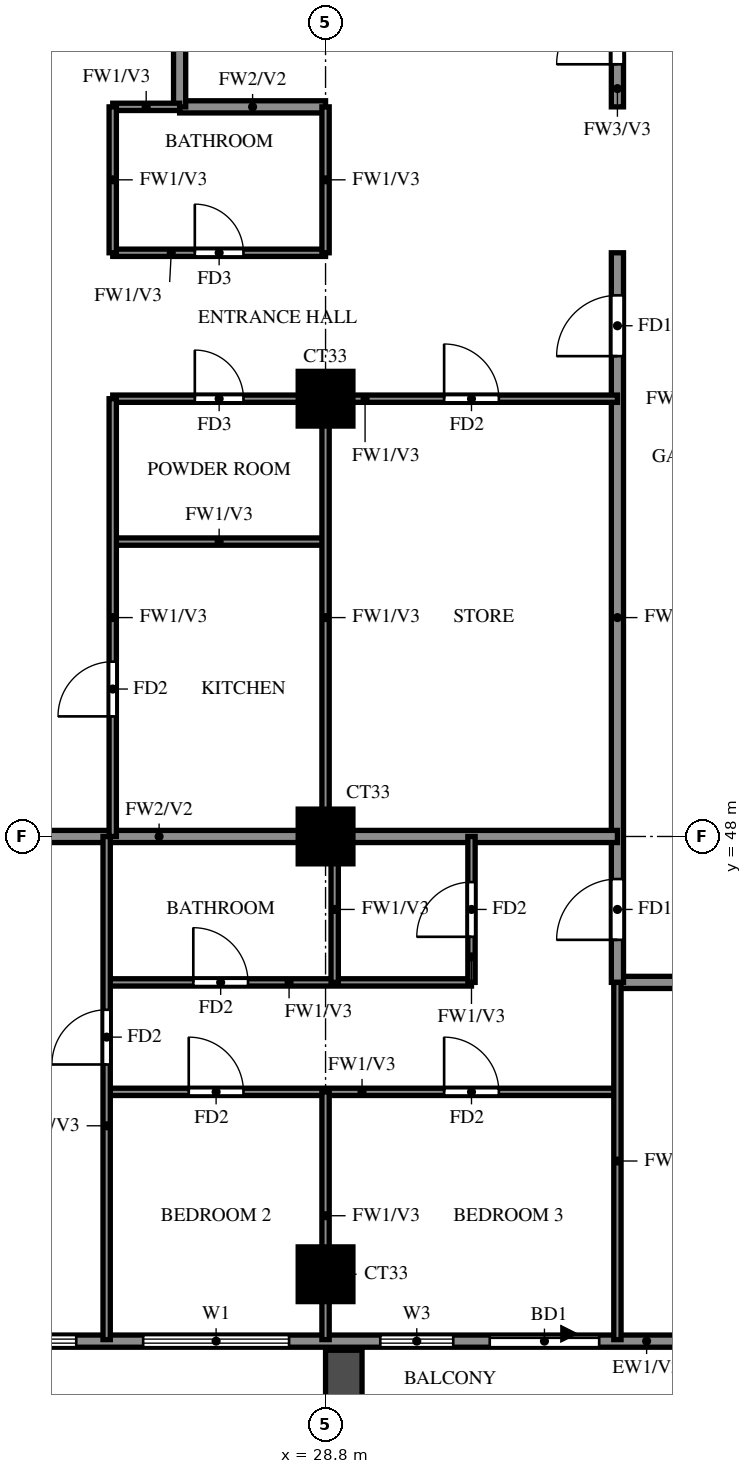
"""IFC4 building model, lengths in metres.
Left out: names, types, materials, properties, quantities, classifications, styles, units other than length and angle.
Written with IfcOpenShell. Run it as: python <this file> out.ifc"""

import sys

from ifc_helpers import new_model, si_unit, direction, frame, frame_2d, origin, origin_2d, place, context, subcontext, project, spatial, rectangle, extrude, source, transform, mapped, element, fill, save


model = new_model("IFC4")
c1 = context("Model", 3, precision=1e-05, world=origin(), true_north=direction((0.0, 1.0)))
c2 = subcontext(c1, "Body", "Model", "MODEL_VIEW")
j1 = project(units=[si_unit("LENGTHUNIT", "METRE"), si_unit("PLANEANGLEUNIT", "RADIAN")], contexts=[c1])
p1 = place(None, origin())
s1 = spatial("IfcSite", under=j1, at=p1, CompositionType="ELEMENT")
p2 = place(p1, origin())
s2 = spatial("IfcBuilding", under=s1, at=p2, CompositionType="ELEMENT")
p3 = place(p2, frame((0.0, 0.0, 222.0)))
s3 = spatial("IfcBuildingStorey", under=s2, at=p3, CompositionType="ELEMENT", Elevation=222.0)
m1 = source(origin(), c2, "Body", "SweptSolid", [
    extrude(rectangle(XDim=0.9, YDim=0.9, at=origin_2d()), origin(), (0.0, 0.0, 1.0), 3.22),
])
for number, where, z_axis, x_axis in (
    (1, (28.8, 40.8, 0.0), (0.0, 0.0, 1.0), (1.0, 0.0, 0.0)),
    (2, (28.8, 48.0, 0.0), (0.0, 0.0, 1.0), (1.0, 0.0, 0.0)),
    (3, (28.8, 55.2, 0.0), (0.0, 0.0, 1.0), (1.0, 0.0, 0.0)),
):
    element("IfcColumn", number, at=place(p3, frame(where, z_axis=z_axis, x_axis=x_axis)), inside=s3, PredefinedType="COLUMN", context=c2, shape_type="MappedRepresentation", body=[
        mapped(m1, transform((0.0, 0.0, 0.0))),
    ])
p4 = place(p3, frame((22.2, 39.7, 0.0), z_axis=(0.0, 0.0, 1.0), x_axis=(1.0, 0.0, 0.0)))
e4 = element("IfcWall", 4, at=p4, inside=s3, PredefinedType="SOLIDWALL", context=c2, shape_type="SweptSolid", body=[
    extrude(rectangle(XDim=19.8, YDim=0.2, at=frame_2d((9.9, 0.0))), origin(), (0.0, 0.0, 1.0), 3.22),
])
p5 = place(p4, frame((9.3, 0.0, 0.0)))
e5 = element("IfcOpeningElement", 5, at=p5, cuts=e4, PredefinedType="OPENING", context=c2, shape_type="SweptSolid", body=[
    extrude(rectangle(XDim=1.8, YDim=2.4, at=frame_2d((0.9, 1.2))), frame((0.0, 0.11, 0.0), z_axis=(0.0, -1.0, 0.0), x_axis=(1.0, 0.0, 0.0)), (0.0, 0.0, 1.0), 0.22),
])
p6 = place(p4, frame((0.7, 0.0, 0.6)))
e6 = element("IfcOpeningElement", 6, at=p6, cuts=e4, PredefinedType="OPENING", context=c2, shape_type="SweptSolid", body=[
    extrude(rectangle(XDim=1.8, YDim=2.4, at=frame_2d((0.9, 1.2))), frame((0.0, 0.11, 0.0), z_axis=(0.0, -1.0, 0.0), x_axis=(1.0, 0.0, 0.0)), (0.0, 0.0, 1.0), 0.22),
])
p7 = place(p4, frame((3.6, 0.0, 0.6)))
e7 = element("IfcOpeningElement", 7, at=p7, cuts=e4, PredefinedType="OPENING", context=c2, shape_type="SweptSolid", body=[
    extrude(rectangle(XDim=2.4, YDim=2.4, at=frame_2d((1.2, 1.2))), frame((0.0, 0.11, 0.0), z_axis=(0.0, -1.0, 0.0), x_axis=(1.0, 0.0, 0.0)), (0.0, 0.0, 1.0), 0.22),
])
p8 = place(p4, frame((7.5, 0.0, 0.6)))
e8 = element("IfcOpeningElement", 8, at=p8, cuts=e4, PredefinedType="OPENING", context=c2, shape_type="SweptSolid", body=[
    extrude(rectangle(XDim=1.2, YDim=2.4, at=frame_2d((0.6, 1.2))), frame((0.0, 0.11, 0.0), z_axis=(0.0, -1.0, 0.0), x_axis=(1.0, 0.0, 0.0)), (0.0, 0.0, 1.0), 0.22),
])
p9 = place(p3, frame((29.1, 39.55, 0.0), z_axis=(0.0, 0.0, 1.0), x_axis=(0.0, -1.0, 0.0)))
e9 = element("IfcWall", 9, at=p9, inside=s3, PredefinedType="SOLIDWALL", context=c2, shape_type="SweptSolid", body=[
    extrude(rectangle(XDim=2.65, YDim=0.6, at=frame_2d((1.325, 0.0))), origin(), (0.0, 0.0, 1.0), 2.85),
])
p10 = place(p3, frame((33.6, 45.6, 0.0), z_axis=(0.0, 0.0, 1.0), x_axis=(1.0, 0.0, 0.0)))
e10 = element("IfcWall", 10, at=p10, inside=s3, PredefinedType="SOLIDWALL", context=c2, shape_type="SweptSolid", body=[
    extrude(rectangle(XDim=7.2, YDim=0.2, at=frame_2d((3.6, 0.0))), origin(), (0.0, 0.0, 1.0), 3.22),
])
p11 = place(p10, frame((3.15, 0.0, 0.0)))
e11 = element("IfcOpeningElement", 11, at=p11, cuts=e10, PredefinedType="OPENING", context=c2, shape_type="SweptSolid", body=[
    extrude(rectangle(XDim=0.9, YDim=2.1, at=frame_2d((0.45, 1.05))), frame((0.0, 0.11, 0.0), z_axis=(0.0, -1.0, 0.0), x_axis=(1.0, 0.0, 0.0)), (0.0, 0.0, 1.0), 0.22),
])
p12 = place(p3, frame((33.6, 45.6, 0.0), z_axis=(0.0, 0.0, 1.0), x_axis=(0.0, 1.0, 0.0)))
e12 = element("IfcWall", 12, at=p12, inside=s3, PredefinedType="SOLIDWALL", context=c2, shape_type="SweptSolid", body=[
    extrude(rectangle(XDim=12.0, YDim=0.2, at=frame_2d((6.0, 0.0))), origin(), (0.0, 0.0, 1.0), 3.22),
])
p13 = place(p12, frame((0.7, 0.0, 0.0)))
e13 = element("IfcOpeningElement", 13, at=p13, cuts=e12, PredefinedType="OPENING", context=c2, shape_type="SweptSolid", body=[
    extrude(rectangle(XDim=1.0, YDim=2.1, at=frame_2d((0.5, 1.05))), frame((0.0, 0.11, 0.0), z_axis=(0.0, -1.0, 0.0), x_axis=(1.0, 0.0, 0.0)), (0.0, 0.0, 1.0), 0.22),
])
p14 = place(p12, frame((10.3, 0.0, 0.0)))
e14 = element("IfcOpeningElement", 14, at=p14, cuts=e12, PredefinedType="OPENING", context=c2, shape_type="SweptSolid", body=[
    extrude(rectangle(XDim=1.0, YDim=2.1, at=frame_2d((0.5, 1.05))), frame((0.0, 0.11, 0.0), z_axis=(0.0, -1.0, 0.0), x_axis=(1.0, 0.0, 0.0)), (0.0, 0.0, 1.0), 0.22),
])
p15 = place(p3, frame((33.6, 60.0, 0.0), z_axis=(0.0, 0.0, 1.0), x_axis=(0.0, 1.0, 0.0)))
e15 = element("IfcWall", 15, at=p15, inside=s3, PredefinedType="SOLIDWALL", context=c2, shape_type="SweptSolid", body=[
    extrude(rectangle(XDim=2.4, YDim=0.2, at=frame_2d((1.2, 0.0))), origin(), (0.0, 0.0, 1.0), 3.22),
])
p16 = place(p15, frame((0.7, 0.0, 0.0)))
e16 = element("IfcOpeningElement", 16, at=p16, cuts=e15, PredefinedType="OPENING", context=c2, shape_type="SweptSolid", body=[
    extrude(rectangle(XDim=1.0, YDim=2.1, at=frame_2d((0.5, 1.05))), frame((0.0, 0.11, 0.0), z_axis=(0.0, -1.0, 0.0), x_axis=(1.0, 0.0, 0.0)), (0.0, 0.0, 1.0), 0.22),
])
p17 = place(p3, frame((18.525, 48.0, 0.0), z_axis=(0.0, 0.0, 1.0), x_axis=(1.0, 0.0, 0.0)))
e17 = element("IfcWall", 17, at=p17, inside=s3, PredefinedType="SOLIDWALL", context=c2, shape_type="SweptSolid", body=[
    extrude(rectangle(XDim=15.075, YDim=0.2, at=frame_2d((7.538, 0.0))), origin(), (0.0, 0.0, 1.0), 3.22),
])
p18 = place(p3, frame((26.4, 60.0, 0.0), z_axis=(0.0, 0.0, 1.0), x_axis=(1.0, 0.0, 0.0)))
e18 = element("IfcWall", 18, at=p18, inside=s3, PredefinedType="SOLIDWALL", context=c2, shape_type="SweptSolid", body=[
    extrude(rectangle(XDim=2.4, YDim=0.2, at=frame_2d((1.2, 0.0))), origin(), (0.0, 0.0, 1.0), 3.22),
])
p19 = place(p3, frame((26.4, 60.0, 0.0), z_axis=(0.0, 0.0, 1.0), x_axis=(0.0, 1.0, 0.0)))
e19 = element("IfcWall", 19, at=p19, inside=s3, PredefinedType="SOLIDWALL", context=c2, shape_type="SweptSolid", body=[
    extrude(rectangle(XDim=2.4, YDim=0.2, at=frame_2d((1.2, 0.0))), origin(), (0.0, 0.0, 1.0), 3.22),
])
p20 = place(p3, frame((25.2, 43.8, 0.0), z_axis=(0.0, 0.0, 1.0), x_axis=(1.0, 0.0, 0.0)))
e20 = element("IfcWall", 20, at=p20, inside=s3, PredefinedType="PARTITIONING", context=c2, shape_type="SweptSolid", body=[
    extrude(rectangle(XDim=8.4, YDim=0.12, at=frame_2d((4.2, 0.0))), origin(), (0.0, 0.0, 1.0), 3.22),
])
p21 = place(p20, frame((1.35, 0.0, 0.0)))
e21 = element("IfcOpeningElement", 21, at=p21, cuts=e20, PredefinedType="OPENING", context=c2, shape_type="SweptSolid", body=[
    extrude(rectangle(XDim=0.9, YDim=2.1, at=frame_2d((0.45, 1.05))), frame((0.0, 0.07, 0.0), z_axis=(0.0, -1.0, 0.0), x_axis=(1.0, 0.0, 0.0)), (0.0, 0.0, 1.0), 0.14),
])
p22 = place(p20, frame((5.55, 0.0, 0.0)))
e22 = element("IfcOpeningElement", 22, at=p22, cuts=e20, PredefinedType="OPENING", context=c2, shape_type="SweptSolid", body=[
    extrude(rectangle(XDim=0.9, YDim=2.1, at=frame_2d((0.45, 1.05))), frame((0.0, 0.07, 0.0), z_axis=(0.0, -1.0, 0.0), x_axis=(1.0, 0.0, 0.0)), (0.0, 0.0, 1.0), 0.14),
])
p23 = place(p3, frame((25.2, 45.6, 0.0), z_axis=(0.0, 0.0, 1.0), x_axis=(1.0, 0.0, 0.0)))
e23 = element("IfcWall", 23, at=p23, inside=s3, PredefinedType="PARTITIONING", context=c2, shape_type="SweptSolid", body=[
    extrude(rectangle(XDim=6.0, YDim=0.12, at=frame_2d((3.0, 0.0))), origin(), (0.0, 0.0, 1.0), 3.22),
])
p24 = place(p23, frame((1.425, 0.0, 0.0)))
e24 = element("IfcOpeningElement", 24, at=p24, cuts=e23, PredefinedType="OPENING", context=c2, shape_type="SweptSolid", body=[
    extrude(rectangle(XDim=0.9, YDim=2.1, at=frame_2d((0.45, 1.05))), frame((0.0, 0.07, 0.0), z_axis=(0.0, -1.0, 0.0), x_axis=(1.0, 0.0, 0.0)), (0.0, 0.0, 1.0), 0.14),
])
p25 = place(p3, frame((25.3, 52.85, 0.0), z_axis=(0.0, 0.0, 1.0), x_axis=(1.0, 0.0, 0.0)))
e25 = element("IfcWall", 25, at=p25, inside=s3, PredefinedType="PARTITIONING", context=c2, shape_type="SweptSolid", body=[
    extrude(rectangle(XDim=3.5, YDim=0.12, at=frame_2d((1.75, 0.0))), origin(), (0.0, 0.0, 1.0), 3.22),
])
p26 = place(p3, frame((25.3, 55.2, 0.0), z_axis=(0.0, 0.0, 1.0), x_axis=(1.0, 0.0, 0.0)))
e26 = element("IfcWall", 26, at=p26, inside=s3, PredefinedType="PARTITIONING", context=c2, shape_type="SweptSolid", body=[
    extrude(rectangle(XDim=8.3, YDim=0.12, at=frame_2d((4.15, 0.0))), origin(), (0.0, 0.0, 1.0), 3.22),
])
p27 = place(p26, frame((1.35, 0.0, 0.0)))
e27 = element("IfcOpeningElement", 27, at=p27, cuts=e26, PredefinedType="OPENING", context=c2, shape_type="SweptSolid", body=[
    extrude(rectangle(XDim=0.8, YDim=2.1, at=frame_2d((0.4, 1.05))), frame((0.0, 0.07, 0.0), z_axis=(0.0, -1.0, 0.0), x_axis=(1.0, 0.0, 0.0)), (0.0, 0.0, 1.0), 0.14),
])
p28 = place(p26, frame((5.45, 0.0, 0.0)))
e28 = element("IfcOpeningElement", 28, at=p28, cuts=e26, PredefinedType="OPENING", context=c2, shape_type="SweptSolid", body=[
    extrude(rectangle(XDim=0.9, YDim=2.1, at=frame_2d((0.45, 1.05))), frame((0.0, 0.07, 0.0), z_axis=(0.0, -1.0, 0.0), x_axis=(1.0, 0.0, 0.0)), (0.0, 0.0, 1.0), 0.14),
])
p29 = place(p3, frame((25.3, 57.6, 0.0), z_axis=(0.0, 0.0, 1.0), x_axis=(1.0, 0.0, 0.0)))
e29 = element("IfcWall", 29, at=p29, inside=s3, PredefinedType="PARTITIONING", context=c2, shape_type="SweptSolid", body=[
    extrude(rectangle(XDim=3.5, YDim=0.12, at=frame_2d((1.75, 0.0))), origin(), (0.0, 0.0, 1.0), 3.22),
])
p30 = place(p29, frame((1.35, 0.0, 0.0)))
e30 = element("IfcOpeningElement", 30, at=p30, cuts=e29, PredefinedType="OPENING", context=c2, shape_type="SweptSolid", body=[
    extrude(rectangle(XDim=0.8, YDim=2.1, at=frame_2d((0.4, 1.05))), frame((0.0, 0.07, 0.0), z_axis=(0.0, -1.0, 0.0), x_axis=(1.0, 0.0, 0.0)), (0.0, 0.0, 1.0), 0.14),
])
p31 = place(p3, frame((25.3, 60.0, 0.0), z_axis=(0.0, 0.0, 1.0), x_axis=(1.0, 0.0, 0.0)))
e31 = element("IfcWall", 31, at=p31, inside=s3, PredefinedType="PARTITIONING", context=c2, shape_type="SweptSolid", body=[
    extrude(rectangle(XDim=1.1, YDim=0.12, at=frame_2d((0.55, 0.0))), origin(), (0.0, 0.0, 1.0), 3.22),
])
p32 = place(p3, frame((25.2, 39.725, 0.0), z_axis=(0.0, 0.0, 1.0), x_axis=(0.0, 1.0, 0.0)))
e32 = element("IfcWall", 32, at=p32, inside=s3, PredefinedType="PARTITIONING", context=c2, shape_type="SweptSolid", body=[
    extrude(rectangle(XDim=8.275, YDim=0.12, at=frame_2d((4.137, 0.0))), origin(), (0.0, 0.0, 1.0), 3.22),
])
p33 = place(p32, frame((4.525, 0.0, 0.0)))
e33 = element("IfcOpeningElement", 33, at=p33, cuts=e32, PredefinedType="OPENING", context=c2, shape_type="SweptSolid", body=[
    extrude(rectangle(XDim=0.9, YDim=2.1, at=frame_2d((0.45, 1.05))), frame((0.0, 0.07, 0.0), z_axis=(0.0, -1.0, 0.0), x_axis=(1.0, 0.0, 0.0)), (0.0, 0.0, 1.0), 0.14),
])
p34 = place(p3, frame((25.3, 48.0, 0.0), z_axis=(0.0, 0.0, 1.0), x_axis=(0.0, 1.0, 0.0)))
e34 = element("IfcWall", 34, at=p34, inside=s3, PredefinedType="PARTITIONING", context=c2, shape_type="SweptSolid", body=[
    extrude(rectangle(XDim=7.2, YDim=0.12, at=frame_2d((3.6, 0.0))), origin(), (0.0, 0.0, 1.0), 3.22),
])
p35 = place(p34, frame((1.975, 0.0, 0.0)))
e35 = element("IfcOpeningElement", 35, at=p35, cuts=e34, PredefinedType="OPENING", context=c2, shape_type="SweptSolid", body=[
    extrude(rectangle(XDim=0.9, YDim=2.1, at=frame_2d((0.45, 1.05))), frame((0.0, 0.07, 0.0), z_axis=(0.0, -1.0, 0.0), x_axis=(1.0, 0.0, 0.0)), (0.0, 0.0, 1.0), 0.14),
])
p36 = place(p3, frame((25.3, 57.6, 0.0), z_axis=(0.0, 0.0, 1.0), x_axis=(0.0, 1.0, 0.0)))
e36 = element("IfcWall", 36, at=p36, inside=s3, PredefinedType="PARTITIONING", context=c2, shape_type="SweptSolid", body=[
    extrude(rectangle(XDim=2.4, YDim=0.12, at=frame_2d((1.2, 0.0))), origin(), (0.0, 0.0, 1.0), 3.22),
])
p37 = place(p3, frame((28.8, 39.725, 0.0), z_axis=(0.0, 0.0, 1.0), x_axis=(0.0, 1.0, 0.0)))
e37 = element("IfcWall", 37, at=p37, inside=s3, PredefinedType="PARTITIONING", context=c2, shape_type="SweptSolid", body=[
    extrude(rectangle(XDim=4.075, YDim=0.12, at=frame_2d((2.038, 0.0))), origin(), (0.0, 0.0, 1.0), 3.22),
])
p38 = place(p3, frame((28.8, 48.0, 0.0), z_axis=(0.0, 0.0, 1.0), x_axis=(0.0, 1.0, 0.0)))
e38 = element("IfcWall", 38, at=p38, inside=s3, PredefinedType="PARTITIONING", context=c2, shape_type="SweptSolid", body=[
    extrude(rectangle(XDim=7.2, YDim=0.12, at=frame_2d((3.6, 0.0))), origin(), (0.0, 0.0, 1.0), 3.22),
])
for number, where, z_axis, x_axis in (
    (39, (28.8, 57.6, 0.0), (0.0, 0.0, 1.0), (0.0, 1.0, 0.0)),
    (40, (28.95, 45.6, 0.0), (0.0, 0.0, 1.0), (0.0, 1.0, 0.0)),
):
    element("IfcWall", number, at=place(p3, frame(where, z_axis=z_axis, x_axis=x_axis)), inside=s3, PredefinedType="PARTITIONING", context=c2, shape_type="SweptSolid", body=[
        extrude(rectangle(XDim=2.4, YDim=0.12, at=frame_2d((1.2, 0.0))), origin(), (0.0, 0.0, 1.0), 3.22),
    ])
p39 = place(p3, frame((31.2, 45.6, 0.0), z_axis=(0.0, 0.0, 1.0), x_axis=(0.0, 1.0, 0.0)))
e41 = element("IfcWall", 41, at=p39, inside=s3, PredefinedType="PARTITIONING", context=c2, shape_type="SweptSolid", body=[
    extrude(rectangle(XDim=2.4, YDim=0.12, at=frame_2d((1.2, 0.0))), origin(), (0.0, 0.0, 1.0), 3.22),
])
p40 = place(p39, frame((0.75, 0.0, 0.0)))
e42 = element("IfcOpeningElement", 42, at=p40, cuts=e41, PredefinedType="OPENING", context=c2, shape_type="SweptSolid", body=[
    extrude(rectangle(XDim=0.9, YDim=2.1, at=frame_2d((0.45, 1.05))), frame((0.0, 0.07, 0.0), z_axis=(0.0, -1.0, 0.0), x_axis=(1.0, 0.0, 0.0)), (0.0, 0.0, 1.0), 0.14),
])
p41 = place(p3, frame((33.6, 39.725, 0.0), z_axis=(0.0, 0.0, 1.0), x_axis=(0.0, 1.0, 0.0)))
e43 = element("IfcWall", 43, at=p41, inside=s3, PredefinedType="PARTITIONING", context=c2, shape_type="SweptSolid", body=[
    extrude(rectangle(XDim=5.875, YDim=0.12, at=frame_2d((2.938, 0.0))), origin(), (0.0, 0.0, 1.0), 3.22),
])
p42 = place(p5, origin())
e44 = element("IfcDoor", 44, at=p42, inside=s3, OperationType="DOUBLE_DOOR_SLIDING", PredefinedType="DOOR", context=c2, shape_type="SweptSolid", body=[
    extrude(rectangle(XDim=1.8, YDim=2.4, at=frame_2d((0.9, 1.2))), frame((0.0, 0.025, 0.0), z_axis=(0.0, -1.0, 0.0), x_axis=(1.0, 0.0, 0.0)), (0.0, 0.0, 1.0), 0.05),
])
fill(e5, e44)
p43 = place(p6, origin())
e45 = element("IfcWindow", 45, at=p43, inside=s3, PartitioningType="DOUBLE_PANEL_VERTICAL", PredefinedType="WINDOW", context=c2, shape_type="SweptSolid", body=[
    extrude(rectangle(XDim=1.8, YDim=2.4, at=frame_2d((0.9, 1.2))), frame((0.0, 0.03, 0.0), z_axis=(0.0, -1.0, 0.0), x_axis=(1.0, 0.0, 0.0)), (0.0, 0.0, 1.0), 0.06),
])
fill(e6, e45)
p44 = place(p7, origin())
e46 = element("IfcWindow", 46, at=p44, inside=s3, PartitioningType="DOUBLE_PANEL_VERTICAL", PredefinedType="WINDOW", context=c2, shape_type="SweptSolid", body=[
    extrude(rectangle(XDim=2.4, YDim=2.4, at=frame_2d((1.2, 1.2))), frame((0.0, 0.03, 0.0), z_axis=(0.0, -1.0, 0.0), x_axis=(1.0, 0.0, 0.0)), (0.0, 0.0, 1.0), 0.06),
])
fill(e7, e46)
p45 = place(p8, origin())
e47 = element("IfcWindow", 47, at=p45, inside=s3, PartitioningType="SINGLE_PANEL", PredefinedType="WINDOW", context=c2, shape_type="SweptSolid", body=[
    extrude(rectangle(XDim=1.2, YDim=2.4, at=frame_2d((0.6, 1.2))), frame((0.0, 0.03, 0.0), z_axis=(0.0, -1.0, 0.0), x_axis=(1.0, 0.0, 0.0)), (0.0, 0.0, 1.0), 0.06),
])
fill(e8, e47)
p46 = place(p13, origin())
e48 = element("IfcDoor", 48, at=p46, inside=s3, OperationType="SINGLE_SWING_LEFT", PredefinedType="DOOR", context=c2, shape_type="SweptSolid", body=[
    extrude(rectangle(XDim=1.0, YDim=2.1, at=frame_2d((0.5, 1.05))), frame((0.0, 0.025, 0.0), z_axis=(0.0, -1.0, 0.0), x_axis=(1.0, 0.0, 0.0)), (0.0, 0.0, 1.0), 0.05),
])
fill(e13, e48)
p47 = place(p33, origin())
e49 = element("IfcDoor", 49, at=p47, inside=s3, OperationType="SINGLE_SWING_RIGHT", PredefinedType="DOOR", context=c2, shape_type="SweptSolid", body=[
    extrude(rectangle(XDim=0.9, YDim=2.1, at=frame_2d((0.45, 1.05))), frame((0.0, 0.025, 0.0), z_axis=(0.0, -1.0, 0.0), x_axis=(1.0, 0.0, 0.0)), (0.0, 0.0, 1.0), 0.05),
])
fill(e33, e49)
p48 = place(p21, origin())
e50 = element("IfcDoor", 50, at=p48, inside=s3, OperationType="SINGLE_SWING_LEFT", PredefinedType="DOOR", context=c2, shape_type="SweptSolid", body=[
    extrude(rectangle(XDim=0.9, YDim=2.1, at=frame_2d((0.45, 1.05))), frame((0.0, 0.025, 0.0), z_axis=(0.0, -1.0, 0.0), x_axis=(1.0, 0.0, 0.0)), (0.0, 0.0, 1.0), 0.05),
])
fill(e21, e50)
p49 = place(p22, origin())
e51 = element("IfcDoor", 51, at=p49, inside=s3, OperationType="SINGLE_SWING_LEFT", PredefinedType="DOOR", context=c2, shape_type="SweptSolid", body=[
    extrude(rectangle(XDim=0.9, YDim=2.1, at=frame_2d((0.45, 1.05))), frame((0.0, 0.025, 0.0), z_axis=(0.0, -1.0, 0.0), x_axis=(1.0, 0.0, 0.0)), (0.0, 0.0, 1.0), 0.05),
])
fill(e22, e51)
p50 = place(p24, origin())
e52 = element("IfcDoor", 52, at=p50, inside=s3, OperationType="SINGLE_SWING_RIGHT", PredefinedType="DOOR", context=c2, shape_type="SweptSolid", body=[
    extrude(rectangle(XDim=0.9, YDim=2.1, at=frame_2d((0.45, 1.05))), frame((0.0, 0.025, 0.0), z_axis=(0.0, -1.0, 0.0), x_axis=(1.0, 0.0, 0.0)), (0.0, 0.0, 1.0), 0.05),
])
fill(e24, e52)
p51 = place(p40, origin())
e53 = element("IfcDoor", 53, at=p51, inside=s3, OperationType="SINGLE_SWING_LEFT", PredefinedType="DOOR", context=c2, shape_type="SweptSolid", body=[
    extrude(rectangle(XDim=0.9, YDim=2.1, at=frame_2d((0.45, 1.05))), frame((0.0, 0.025, 0.0), z_axis=(0.0, -1.0, 0.0), x_axis=(1.0, 0.0, 0.0)), (0.0, 0.0, 1.0), 0.05),
])
fill(e42, e53)
p52 = place(p14, origin())
e54 = element("IfcDoor", 54, at=p52, inside=s3, OperationType="SINGLE_SWING_RIGHT", PredefinedType="DOOR", context=c2, shape_type="SweptSolid", body=[
    extrude(rectangle(XDim=1.0, YDim=2.1, at=frame_2d((0.5, 1.05))), frame((0.0, 0.025, 0.0), z_axis=(0.0, -1.0, 0.0), x_axis=(1.0, 0.0, 0.0)), (0.0, 0.0, 1.0), 0.05),
])
fill(e14, e54)
p53 = place(p35, origin())
e55 = element("IfcDoor", 55, at=p53, inside=s3, OperationType="SINGLE_SWING_LEFT", PredefinedType="DOOR", context=c2, shape_type="SweptSolid", body=[
    extrude(rectangle(XDim=0.9, YDim=2.1, at=frame_2d((0.45, 1.05))), frame((0.0, 0.025, 0.0), z_axis=(0.0, -1.0, 0.0), x_axis=(1.0, 0.0, 0.0)), (0.0, 0.0, 1.0), 0.05),
])
fill(e35, e55)
p54 = place(p27, origin())
e56 = element("IfcDoor", 56, at=p54, inside=s3, OperationType="SINGLE_SWING_LEFT", PredefinedType="DOOR", context=c2, shape_type="SweptSolid", body=[
    extrude(rectangle(XDim=0.8, YDim=2.1, at=frame_2d((0.4, 1.05))), frame((0.0, 0.025, 0.0), z_axis=(0.0, -1.0, 0.0), x_axis=(1.0, 0.0, 0.0)), (0.0, 0.0, 1.0), 0.05),
])
fill(e27, e56)
p55 = place(p30, origin())
e57 = element("IfcDoor", 57, at=p55, inside=s3, OperationType="SINGLE_SWING_RIGHT", PredefinedType="DOOR", context=c2, shape_type="SweptSolid", body=[
    extrude(rectangle(XDim=0.8, YDim=2.1, at=frame_2d((0.4, 1.05))), frame((0.0, 0.025, 0.0), z_axis=(0.0, -1.0, 0.0), x_axis=(1.0, 0.0, 0.0)), (0.0, 0.0, 1.0), 0.05),
])
fill(e30, e57)
p56 = place(p28, origin())
e58 = element("IfcDoor", 58, at=p56, inside=s3, OperationType="SINGLE_SWING_LEFT", PredefinedType="DOOR", context=c2, shape_type="SweptSolid", body=[
    extrude(rectangle(XDim=0.9, YDim=2.1, at=frame_2d((0.45, 1.05))), frame((0.0, 0.025, 0.0), z_axis=(0.0, -1.0, 0.0), x_axis=(1.0, 0.0, 0.0)), (0.0, 0.0, 1.0), 0.05),
])
fill(e28, e58)
p57 = place(p16, origin())
e59 = element("IfcDoor", 59, at=p57, inside=s3, OperationType="SINGLE_SWING_LEFT", PredefinedType="DOOR", context=c2, shape_type="SweptSolid", body=[
    extrude(rectangle(XDim=1.0, YDim=2.1, at=frame_2d((0.5, 1.05))), frame((0.0, 0.025, 0.0), z_axis=(0.0, -1.0, 0.0), x_axis=(1.0, 0.0, 0.0)), (0.0, 0.0, 1.0), 0.05),
])
fill(e16, e59)
save(model, sys.argv[1])
